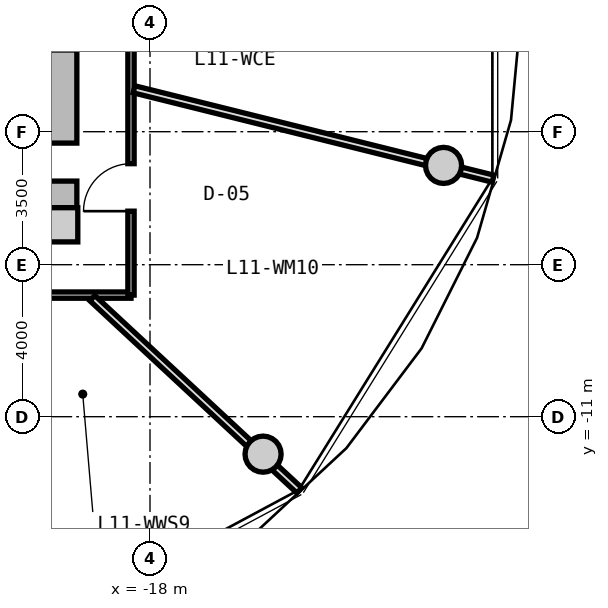
"""IFC4 building model, lengths in metres.
Left out: names, types, materials, properties, quantities, classifications, styles, units other than length and angle.
Written with IfcOpenShell. Run it as: python <this file> out.ifc"""

import sys

from ifc_helpers import new_model, si_unit, direction, frame, frame_2d, origin, origin_2d, place, context, subcontext, project, spatial, rectangle, circle, extrude, source, transform, mapped, element, fill, save


model = new_model("IFC4")
c1 = context("Model", 3, precision=1e-05, world=origin(), true_north=direction((0.0, 1.0)))
c2 = subcontext(c1, "Body", "Model", "MODEL_VIEW")
j1 = project(units=[si_unit("LENGTHUNIT", "METRE"), si_unit("PLANEANGLEUNIT", "RADIAN")], contexts=[c1])
p1 = place(None, origin())
s1 = spatial("IfcSite", under=j1, at=p1, CompositionType="ELEMENT")
p2 = place(p1, origin())
s2 = spatial("IfcBuilding", under=s1, at=p2, CompositionType="ELEMENT")
p3 = place(p2, frame((0.0, 0.0, 39.9)))
s3 = spatial("IfcBuildingStorey", under=s2, at=p3, CompositionType="ELEMENT", Elevation=39.9)
m1 = source(origin(), c2, "Body", "SweptSolid", [
    extrude(rectangle(XDim=0.9, YDim=0.9, at=origin_2d()), origin(), (0.0, 0.0, 1.0), 3.05),
])
p4 = place(p3, frame((-20.35, -5.95, 0.0), z_axis=(0.0, 0.0, 1.0), x_axis=(1.0, 0.0, 0.0)))
e1 = element("IfcColumn", 1, at=p4, inside=s3, PredefinedType="COLUMN", context=c2, shape_type="MappedRepresentation", body=[
    mapped(m1, transform((0.0, 0.0, 0.0), x_axis=(1.0, 0.0, 0.0), y_axis=(0.0, 1.0, 0.0), z_axis=(0.0, 0.0, 1.0), scale=1.0)),
])
m2 = source(origin(), c2, "Body", "SweptSolid", [
    extrude(rectangle(XDim=11.0, YDim=0.85, at=frame_2d((5.5, 0.0))), origin(), (0.0, 0.0, 1.0), 2.79),
])
p5 = place(p3, frame((-20.35, 5.5, 0.0), z_axis=(0.0, 0.0, 1.0), x_axis=(0.0, -1.0, 0.0)))
e2 = element("IfcWall", 2, at=p5, inside=s3, PredefinedType="SHEAR", context=c2, shape_type="MappedRepresentation", body=[
    mapped(m2, transform((0.0, 0.0, 0.0), x_axis=(1.0, 0.0, 0.0), y_axis=(0.0, 1.0, 0.0), z_axis=(0.0, 0.0, 1.0), scale=1.0)),
])
p6 = place(p5, frame((5.65, 0.0, 0.0)))
e3 = element("IfcOpeningElement", 3, at=p6, cuts=e2, PredefinedType="OPENING", context=c2, shape_type="SweptSolid", body=[
    extrude(rectangle(XDim=1.2, YDim=2.15, at=frame_2d((0.6, 1.075))), frame((0.0, 0.435, 0.0), z_axis=(0.0, -1.0, 0.0), x_axis=(1.0, 0.0, 0.0)), (0.0, 0.0, 1.0), 0.87),
])
p7 = place(p5, frame((9.3, 0.0, 0.0)))
e4 = element("IfcOpeningElement", 4, at=p7, cuts=e2, PredefinedType="OPENING", context=c2, shape_type="SweptSolid", body=[
    extrude(rectangle(XDim=1.0, YDim=2.1, at=frame_2d((0.5, 1.05))), frame((0.0, 0.435, 0.0), z_axis=(0.0, -1.0, 0.0), x_axis=(1.0, 0.0, 0.0)), (0.0, 0.0, 1.0), 0.87),
])
m3 = source(origin(), c2, "Body", "SweptSolid", [
    extrude(circle(Radius=0.475, at=origin_2d()), origin(), (0.0, 0.0, 1.0), 3.05),
])
for number, where, z_axis, x_axis in (
    (5, (-15.025, -11.985, 0.0), (0.0, 0.0, 1.0), (1.0, 0.0, 0.0)),
    (6, (-10.275, -4.387, 0.0), (0.0, 0.0, 1.0), (1.0, 0.0, 0.0)),
):
    element("IfcColumn", number, at=place(p3, frame(where, z_axis=z_axis, x_axis=x_axis)), inside=s3, PredefinedType="COLUMN", context=c2, shape_type="MappedRepresentation", body=[
        mapped(m3, transform((0.0, 0.0, 0.0), x_axis=(1.0, 0.0, 0.0), y_axis=(0.0, 1.0, 0.0), z_axis=(0.0, 0.0, 1.0), scale=1.0)),
    ])
m4 = source(origin(), c2, "Body", "SweptSolid", [
    extrude(rectangle(XDim=19.0, YDim=0.165, at=frame_2d((9.5, 0.0))), origin(), (0.0, 0.0, 1.0), 2.775),
])
p8 = place(p3, frame((-18.5, -7.8, 0.0), z_axis=(0.0, 0.0, 1.0), x_axis=(-1.0, 0.0, 0.0)))
e7 = element("IfcWall", 7, at=p8, inside=s3, PredefinedType="PARTITIONING", context=c2, shape_type="MappedRepresentation", body=[
    mapped(m4, transform((0.0, 0.0, 0.0), x_axis=(1.0, 0.0, 0.0), y_axis=(0.0, 1.0, 0.0), z_axis=(0.0, 0.0, 1.0), scale=1.0)),
])
p9 = place(p8, frame((15.652, 0.0, 0.0)))
e8 = element("IfcOpeningElement", 8, at=p9, cuts=e7, PredefinedType="OPENING", context=c2, shape_type="SweptSolid", body=[
    extrude(rectangle(XDim=1.05, YDim=2.15, at=frame_2d((0.525, 1.075))), frame((0.0, 0.093, 0.0), z_axis=(0.0, -1.0, 0.0), x_axis=(1.0, 0.0, 0.0)), (0.0, 0.0, 1.0), 0.185),
])
p10 = place(p8, frame((12.5, 0.0, 0.0)))
e9 = element("IfcOpeningElement", 9, at=p10, cuts=e7, PredefinedType="OPENING", context=c2, shape_type="SweptSolid", body=[
    extrude(rectangle(XDim=1.05, YDim=2.15, at=frame_2d((0.525, 1.075))), frame((0.0, 0.093, 0.0), z_axis=(0.0, -1.0, 0.0), x_axis=(1.0, 0.0, 0.0)), (0.0, 0.0, 1.0), 0.185),
])
p11 = place(p8, frame((10.104, 0.0, 0.0)))
e10 = element("IfcOpeningElement", 10, at=p11, cuts=e7, PredefinedType="OPENING", context=c2, shape_type="SweptSolid", body=[
    extrude(rectangle(XDim=1.05, YDim=2.15, at=frame_2d((0.525, 1.075))), frame((0.0, 0.093, 0.0), z_axis=(0.0, -1.0, 0.0), x_axis=(1.0, 0.0, 0.0)), (0.0, 0.0, 1.0), 0.185),
])
p12 = place(p8, frame((7.806, 0.0, 0.0)))
e11 = element("IfcOpeningElement", 11, at=p12, cuts=e7, PredefinedType="OPENING", context=c2, shape_type="SweptSolid", body=[
    extrude(rectangle(XDim=1.05, YDim=2.15, at=frame_2d((0.525, 1.075))), frame((0.0, 0.093, 0.0), z_axis=(0.0, -1.0, 0.0), x_axis=(1.0, 0.0, 0.0)), (0.0, 0.0, 1.0), 0.185),
])
p13 = place(p8, frame((5.915, 0.0, 0.0)))
e12 = element("IfcOpeningElement", 12, at=p13, cuts=e7, PredefinedType="OPENING", context=c2, shape_type="SweptSolid", body=[
    extrude(rectangle(XDim=0.92, YDim=2.1, at=frame_2d((0.46, 1.05))), frame((0.0, 0.093, 0.0), z_axis=(0.0, -1.0, 0.0), x_axis=(1.0, 0.0, 0.0)), (0.0, 0.0, 1.0), 0.185),
])
p14 = place(p8, frame((2.769, 0.0, 0.0)))
e13 = element("IfcOpeningElement", 13, at=p14, cuts=e7, PredefinedType="OPENING", context=c2, shape_type="SweptSolid", body=[
    extrude(rectangle(XDim=0.92, YDim=2.1, at=frame_2d((0.46, 1.05))), frame((0.0, 0.093, 0.0), z_axis=(0.0, -1.0, 0.0), x_axis=(1.0, 0.0, 0.0)), (0.0, 0.0, 1.0), 0.185),
])
m5 = source(origin(), c2, "Body", "SweptSolid", [
    extrude(rectangle(XDim=15.6, YDim=0.165, at=frame_2d((7.8, 0.0))), origin(), (0.0, 0.0, 1.0), 2.775),
])
p15 = place(p3, frame((-18.5, 7.8, 0.0), z_axis=(0.0, 0.0, 1.0), x_axis=(0.0, -1.0, 0.0)))
e14 = element("IfcWall", 14, at=p15, inside=s3, PredefinedType="PARTITIONING", context=c2, shape_type="MappedRepresentation", body=[
    mapped(m5, transform((0.0, 0.0, 0.0), x_axis=(1.0, 0.0, 0.0), y_axis=(0.0, 1.0, 0.0), z_axis=(0.0, 0.0, 1.0), scale=1.0)),
])
p16 = place(p15, frame((12.141, 0.0, 0.0)))
e15 = element("IfcOpeningElement", 15, at=p16, cuts=e14, PredefinedType="OPENING", context=c2, shape_type="SweptSolid", body=[
    extrude(rectangle(XDim=1.25, YDim=2.2, at=frame_2d((0.625, 1.1))), frame((0.0, 0.093, 0.0), z_axis=(0.0, -1.0, 0.0), x_axis=(1.0, 0.0, 0.0)), (0.0, 0.0, 1.0), 0.185),
])
p17 = place(p15, frame((7.175, 0.0, 0.0)))
e16 = element("IfcOpeningElement", 16, at=p17, cuts=e14, PredefinedType="OPENING", context=c2, shape_type="SweptSolid", body=[
    extrude(rectangle(XDim=1.25, YDim=2.2, at=frame_2d((0.625, 1.1))), frame((0.0, 0.093, 0.0), z_axis=(0.0, -1.0, 0.0), x_axis=(1.0, 0.0, 0.0)), (0.0, 0.0, 1.0), 0.185),
])
p18 = place(p15, frame((2.826, 0.0, 0.0)))
e17 = element("IfcOpeningElement", 17, at=p18, cuts=e14, PredefinedType="OPENING", context=c2, shape_type="SweptSolid", body=[
    extrude(rectangle(XDim=1.05, YDim=2.15, at=frame_2d((0.525, 1.075))), frame((0.0, 0.093, 0.0), z_axis=(0.0, -1.0, 0.0), x_axis=(1.0, 0.0, 0.0)), (0.0, 0.0, 1.0), 0.185),
])
p19 = place(p15, frame((0.881, 0.0, 0.0)))
e18 = element("IfcOpeningElement", 18, at=p19, cuts=e14, PredefinedType="OPENING", context=c2, shape_type="SweptSolid", body=[
    extrude(rectangle(XDim=1.05, YDim=2.15, at=frame_2d((0.525, 1.075))), frame((0.0, 0.093, 0.0), z_axis=(0.0, -1.0, 0.0), x_axis=(1.0, 0.0, 0.0)), (0.0, 0.0, 1.0), 0.185),
])
m6 = source(origin(), c2, "Body", "SweptSolid", [
    extrude(rectangle(XDim=7.435, YDim=0.19, at=frame_2d((3.717, 0.0))), origin(), (0.0, 0.0, 1.0), 2.225),
])
p20 = place(p3, frame((-19.517, -7.88, 0.0), z_axis=(0.0, 0.0, 1.0), x_axis=(0.732651956848, -0.680603489652, 0.0)))
e19 = element("IfcWall", 19, at=p20, inside=s3, PredefinedType="PARTITIONING", context=c2, shape_type="MappedRepresentation", body=[
    mapped(m6, transform((0.0, 0.0, 0.0), x_axis=(1.0, 0.0, 0.0), y_axis=(0.0, 1.0, 0.0), z_axis=(0.0, 0.0, 1.0), scale=1.0)),
])
m7 = source(origin(), c2, "Body", "SweptSolid", [
    extrude(rectangle(XDim=9.225, YDim=0.14, at=frame_2d((4.613, 0.0))), origin(), (0.0, 0.0, 1.0), 2.775),
])
p21 = place(p3, frame((-24.054, -7.83, 0.0), z_axis=(0.0, 0.0, 1.0), x_axis=(0.450460543767, -0.892796336523, 0.0)))
e20 = element("IfcWall", 20, at=p21, inside=s3, PredefinedType="PARTITIONING", context=c2, shape_type="MappedRepresentation", body=[
    mapped(m7, transform((0.0, 0.0, 0.0), x_axis=(1.0, 0.0, 0.0), y_axis=(0.0, 1.0, 0.0), z_axis=(0.0, 0.0, 1.0), scale=1.0)),
])
m8 = source(origin(), c2, "Body", "SweptSolid", [
    extrude(rectangle(XDim=9.737, YDim=0.19, at=frame_2d((4.869, 0.0))), origin(), (0.0, 0.0, 1.0), 2.225),
])
p22 = place(p3, frame((-18.42, -2.385, 0.0), z_axis=(0.0, 0.0, 1.0), x_axis=(0.970392716238, -0.241532557375, 0.0)))
e21 = element("IfcWall", 21, at=p22, inside=s3, PredefinedType="PARTITIONING", context=c2, shape_type="MappedRepresentation", body=[
    mapped(m8, transform((0.0, 0.0, 0.0), x_axis=(1.0, 0.0, 0.0), y_axis=(0.0, 1.0, 0.0), z_axis=(0.0, 0.0, 1.0), scale=1.0)),
])
m9 = source(origin(), c2, "Body", "SweptSolid", [
    extrude(rectangle(XDim=1.0, YDim=2.1, at=frame_2d((0.5, 1.05))), frame((0.0, 0.025, 0.0), z_axis=(0.0, -1.0, 0.0), x_axis=(1.0, 0.0, 0.0)), (0.0, 0.0, 1.0), 0.05),
])
p23 = place(p7, frame((1.0, 0.0, 0.0), z_axis=(0.0, 0.0, 1.0), x_axis=(-1.0, 0.0, 0.0)))
e22 = element("IfcDoor", 22, at=p23, inside=s3, OperationType="SINGLE_SWING_RIGHT", PredefinedType="DOOR", context=c2, shape_type="MappedRepresentation", body=[
    mapped(m9, transform((0.0, 0.0, 0.0), x_axis=(1.0, 0.0, 0.0), y_axis=(0.0, 1.0, 0.0), z_axis=(0.0, 0.0, 1.0), scale=1.0)),
])
fill(e4, e22)
m10 = source(origin(), c2, "Body", "SweptSolid", [
    extrude(rectangle(XDim=1.25, YDim=2.2, at=frame_2d((0.625, 1.1))), frame((0.0, 0.025, 0.0), z_axis=(0.0, -1.0, 0.0), x_axis=(1.0, 0.0, 0.0)), (0.0, 0.0, 1.0), 0.05),
])
p24 = place(p16, frame((1.25, 0.0, 0.0), z_axis=(0.0, 0.0, 1.0), x_axis=(-1.0, 0.0, 0.0)))
e23 = element("IfcDoor", 23, at=p24, inside=s3, OperationType="SINGLE_SWING_LEFT", PredefinedType="DOOR", context=c2, shape_type="MappedRepresentation", body=[
    mapped(m10, transform((0.0, 0.0, 0.0), x_axis=(1.0, 0.0, 0.0), y_axis=(0.0, 1.0, 0.0), z_axis=(0.0, 0.0, 1.0), scale=1.0)),
])
fill(e15, e23)
save(model, sys.argv[1])
